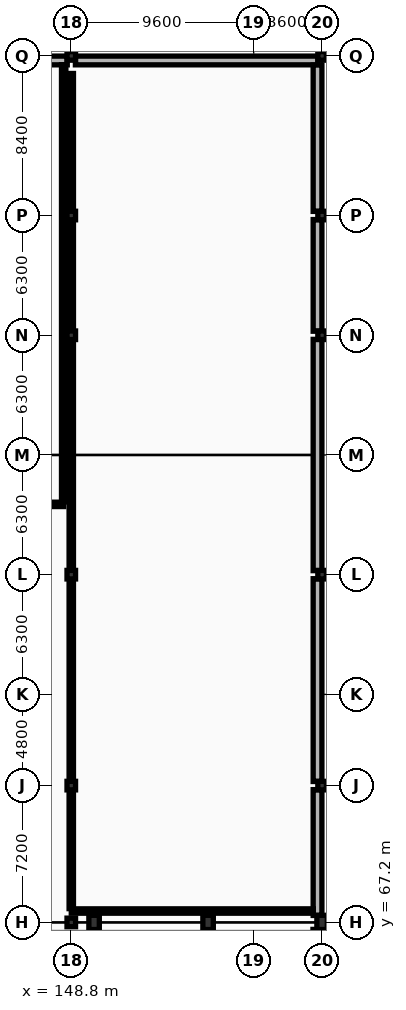
"""IFC4 building model, lengths in metres.
Left out: names, types, materials, properties, quantities, classifications, styles, units other than length and angle.
Written with IfcOpenShell. Run it as: python <this file> out.ifc"""

import sys

from ifc_helpers import new_model, si_unit, direction, frame, frame_2d, origin, origin_2d, place, context, subcontext, project, spatial, rectangle, extrude, element, fill, save


model = new_model("IFC4")
c1 = context("Model", 3, precision=1e-05, world=origin(), true_north=direction((0.0, 1.0)))
c2 = subcontext(c1, "Body", "Model", "MODEL_VIEW")
j1 = project(units=[si_unit("LENGTHUNIT", "METRE"), si_unit("PLANEANGLEUNIT", "RADIAN")], contexts=[c1])
p1 = place(None, origin())
s1 = spatial("IfcSite", under=j1, at=p1, CompositionType="ELEMENT")
p2 = place(p1, origin())
s2 = spatial("IfcBuilding", under=s1, at=p2, CompositionType="ELEMENT")
p3 = place(p2, frame((0.0, 0.0, 5.4)))
s3 = spatial("IfcBuildingStorey", under=s2, at=p3, CompositionType="ELEMENT", Elevation=5.4)
for number, where, z_axis, x_axis in (
    (1, (150.0, 67.2, 0.0), (0.0, 0.0, 1.0), (1.0, 0.0, 0.0)),
    (2, (156.0, 67.2, 0.0), (0.0, 0.0, 1.0), (1.0, 0.0, 0.0)),
    (3, (162.0, 67.2, 0.0), (0.0, 0.0, 1.0), (1.0, 0.0, 0.0)),
):
    element("IfcColumn", number, at=place(p3, frame(where, z_axis=z_axis, x_axis=x_axis)), inside=s3, PredefinedType="COLUMN", context=c2, shape_type="SweptSolid", body=[
        extrude(rectangle(XDim=0.55, YDim=0.75, at=origin_2d()), origin(), (0.0, 0.0, 1.0), 4.5),
    ])
for number, where, z_axis, x_axis in (
    (4, (148.8, 67.2, 0.0), (0.0, 0.0, 1.0), (1.0, 0.0, 0.0)),
    (5, (148.8, 74.4, 0.0), (0.0, 0.0, 1.0), (1.0, 0.0, 0.0)),
    (6, (148.8, 85.5, 0.0), (0.0, 0.0, 1.0), (1.0, 0.0, 0.0)),
    (7, (148.8, 98.1, 0.0), (0.0, 0.0, 1.0), (1.0, 0.0, 0.0)),
    (8, (148.8, 104.4, 0.0), (0.0, 0.0, 1.0), (1.0, 0.0, 0.0)),
    (9, (148.8, 112.8, 0.0), (0.0, 0.0, 1.0), (1.0, 0.0, 0.0)),
    (10, (162.0, 74.4, 0.0), (0.0, 0.0, 1.0), (1.0, 0.0, 0.0)),
    (11, (162.0, 85.5, 0.0), (0.0, 0.0, 1.0), (1.0, 0.0, 0.0)),
    (12, (162.0, 98.1, 0.0), (0.0, 0.0, 1.0), (1.0, 0.0, 0.0)),
    (13, (162.0, 104.4, 0.0), (0.0, 0.0, 1.0), (1.0, 0.0, 0.0)),
    (14, (162.0, 112.8, 0.0), (0.0, 0.0, 1.0), (1.0, 0.0, 0.0)),
):
    element("IfcColumn", number, at=place(p3, frame(where, z_axis=z_axis, x_axis=x_axis)), inside=s3, PredefinedType="COLUMN", context=c2, shape_type="SweptSolid", body=[
        extrude(rectangle(XDim=0.45, YDim=0.45, at=origin_2d()), origin(), (0.0, 0.0, 1.0), 4.5),
    ])
p4 = place(p3, frame((161.76, 66.833, 0.0), z_axis=(0.0, 0.0, 1.0), x_axis=(0.0, -1.0, 0.0)))
e15 = element("IfcWall", 15, at=p4, inside=s3, PredefinedType="STANDARD", context=c2, shape_type="SweptSolid", body=[
    extrude(rectangle(XDim=7.666, YDim=0.48, at=frame_2d((3.833, 0.0))), origin(), (0.0, 0.0, 1.0), 3.27),
])
p5 = place(p4, frame((1.408, 0.0, 0.75)))
e16 = element("IfcOpeningElement", 16, at=p5, cuts=e15, PredefinedType="OPENING", context=c2, shape_type="SweptSolid", body=[
    extrude(rectangle(XDim=1.7, YDim=2.3, at=frame_2d((0.85, 1.15))), frame((0.0, 0.25, 0.0), z_axis=(0.0, -1.0, 0.0), x_axis=(1.0, 0.0, 0.0)), (0.0, 0.0, 1.0), 0.5),
])
p6 = place(p4, frame((4.558, 0.0, 0.75)))
e17 = element("IfcOpeningElement", 17, at=p6, cuts=e15, PredefinedType="OPENING", context=c2, shape_type="SweptSolid", body=[
    extrude(rectangle(XDim=1.7, YDim=2.3, at=frame_2d((0.85, 1.15))), frame((0.0, 0.25, 0.0), z_axis=(0.0, -1.0, 0.0), x_axis=(1.0, 0.0, 0.0)), (0.0, 0.0, 1.0), 0.5),
])
p7 = place(p3, frame((139.412, 112.56, 0.0), z_axis=(0.0, 0.0, 1.0), x_axis=(1.0, 0.0, 0.0)))
e18 = element("IfcWall", 18, at=p7, inside=s3, PredefinedType="STANDARD", context=c2, shape_type="SweptSolid", body=[
    extrude(rectangle(XDim=9.176, YDim=0.46, at=frame_2d((4.588, 0.0))), origin(), (0.0, 0.0, 1.0), 3.72),
])
p8 = place(p7, frame((2.278, 0.0, 2.15)))
e19 = element("IfcOpeningElement", 19, at=p8, cuts=e18, PredefinedType="OPENING", context=c2, shape_type="SweptSolid", body=[
    extrude(rectangle(XDim=0.85, YDim=0.9, at=frame_2d((0.425, 0.45))), frame((0.0, 0.24, 0.0), z_axis=(0.0, -1.0, 0.0), x_axis=(1.0, 0.0, 0.0)), (0.0, 0.0, 1.0), 0.48),
])
p9 = place(p7, frame((6.048, 0.0, 2.15)))
e20 = element("IfcOpeningElement", 20, at=p9, cuts=e18, PredefinedType="OPENING", context=c2, shape_type="SweptSolid", body=[
    extrude(rectangle(XDim=0.85, YDim=0.9, at=frame_2d((0.425, 0.45))), frame((0.0, 0.24, 0.0), z_axis=(0.0, -1.0, 0.0), x_axis=(1.0, 0.0, 0.0)), (0.0, 0.0, 1.0), 0.48),
])
p10 = place(p3, frame((149.017, 112.56, 0.0), z_axis=(0.0, 0.0, 1.0), x_axis=(1.0, 0.0, 0.0)))
e21 = element("IfcWall", 21, at=p10, inside=s3, PredefinedType="STANDARD", context=c2, shape_type="SweptSolid", body=[
    extrude(rectangle(XDim=12.766, YDim=0.46, at=frame_2d((6.383, 0.0))), origin(), (0.0, 0.0, 1.0), 3.72),
])
p11 = place(p10, frame((3.173, 0.0, 2.15)))
e22 = element("IfcOpeningElement", 22, at=p11, cuts=e21, PredefinedType="OPENING", context=c2, shape_type="SweptSolid", body=[
    extrude(rectangle(XDim=0.85, YDim=0.9, at=frame_2d((0.425, 0.45))), frame((0.0, 0.24, 0.0), z_axis=(0.0, -1.0, 0.0), x_axis=(1.0, 0.0, 0.0)), (0.0, 0.0, 1.0), 0.48),
])
p12 = place(p10, frame((8.743, 0.0, 2.15)))
e23 = element("IfcOpeningElement", 23, at=p12, cuts=e21, PredefinedType="OPENING", context=c2, shape_type="SweptSolid", body=[
    extrude(rectangle(XDim=0.85, YDim=0.9, at=frame_2d((0.425, 0.45))), frame((0.0, 0.24, 0.0), z_axis=(0.0, -1.0, 0.0), x_axis=(1.0, 0.0, 0.0)), (0.0, 0.0, 1.0), 0.48),
])
p13 = place(p3, frame((161.76, 74.188, 0.0), z_axis=(0.0, 0.0, 1.0), x_axis=(0.0, -1.0, 0.0)))
e24 = element("IfcWall", 24, at=p13, inside=s3, PredefinedType="STANDARD", context=c2, shape_type="SweptSolid", body=[
    extrude(rectangle(XDim=6.621, YDim=0.46, at=frame_2d((3.311, 0.0))), origin(), (0.0, 0.0, 1.0), 3.37),
])
p14 = place(p13, frame((1.678, 0.0, 2.15)))
e25 = element("IfcOpeningElement", 25, at=p14, cuts=e24, PredefinedType="OPENING", context=c2, shape_type="SweptSolid", body=[
    extrude(rectangle(XDim=0.85, YDim=0.9, at=frame_2d((0.425, 0.45))), frame((0.0, 0.24, 0.0), z_axis=(0.0, -1.0, 0.0), x_axis=(1.0, 0.0, 0.0)), (0.0, 0.0, 1.0), 0.48),
])
p15 = place(p13, frame((4.248, 0.0, 2.15)))
e26 = element("IfcOpeningElement", 26, at=p15, cuts=e24, PredefinedType="OPENING", context=c2, shape_type="SweptSolid", body=[
    extrude(rectangle(XDim=0.85, YDim=0.9, at=frame_2d((0.425, 0.45))), frame((0.0, 0.24, 0.0), z_axis=(0.0, -1.0, 0.0), x_axis=(1.0, 0.0, 0.0)), (0.0, 0.0, 1.0), 0.48),
])
p16 = place(p3, frame((161.76, 85.288, 0.0), z_axis=(0.0, 0.0, 1.0), x_axis=(0.0, -1.0, 0.0)))
e27 = element("IfcWall", 27, at=p16, inside=s3, PredefinedType="STANDARD", context=c2, shape_type="SweptSolid", body=[
    extrude(rectangle(XDim=10.671, YDim=0.46, at=frame_2d((5.335, 0.0))), origin(), (0.0, 0.0, 1.0), 3.37),
])
p17 = place(p16, frame((2.653, 0.0, 2.15)))
e28 = element("IfcOpeningElement", 28, at=p17, cuts=e27, PredefinedType="OPENING", context=c2, shape_type="SweptSolid", body=[
    extrude(rectangle(XDim=0.85, YDim=0.9, at=frame_2d((0.425, 0.45))), frame((0.0, 0.24, 0.0), z_axis=(0.0, -1.0, 0.0), x_axis=(1.0, 0.0, 0.0)), (0.0, 0.0, 1.0), 0.48),
])
p18 = place(p16, frame((7.173, 0.0, 2.15)))
e29 = element("IfcOpeningElement", 29, at=p18, cuts=e27, PredefinedType="OPENING", context=c2, shape_type="SweptSolid", body=[
    extrude(rectangle(XDim=0.85, YDim=0.9, at=frame_2d((0.425, 0.45))), frame((0.0, 0.24, 0.0), z_axis=(0.0, -1.0, 0.0), x_axis=(1.0, 0.0, 0.0)), (0.0, 0.0, 1.0), 0.48),
])
p19 = place(p3, frame((161.76, 97.883, 0.0), z_axis=(0.0, 0.0, 1.0), x_axis=(0.0, -1.0, 0.0)))
e30 = element("IfcWall", 30, at=p19, inside=s3, PredefinedType="STANDARD", context=c2, shape_type="SweptSolid", body=[
    extrude(rectangle(XDim=12.171, YDim=0.46, at=frame_2d((6.085, 0.0))), origin(), (0.0, 0.0, 1.0), 3.37),
])
p20 = place(p19, frame((3.023, 0.0, 2.15)))
e31 = element("IfcOpeningElement", 31, at=p20, cuts=e30, PredefinedType="OPENING", context=c2, shape_type="SweptSolid", body=[
    extrude(rectangle(XDim=0.85, YDim=0.9, at=frame_2d((0.425, 0.45))), frame((0.0, 0.24, 0.0), z_axis=(0.0, -1.0, 0.0), x_axis=(1.0, 0.0, 0.0)), (0.0, 0.0, 1.0), 0.48),
])
p21 = place(p19, frame((8.293, 0.0, 2.15)))
e32 = element("IfcOpeningElement", 32, at=p21, cuts=e30, PredefinedType="OPENING", context=c2, shape_type="SweptSolid", body=[
    extrude(rectangle(XDim=0.85, YDim=0.9, at=frame_2d((0.425, 0.45))), frame((0.0, 0.24, 0.0), z_axis=(0.0, -1.0, 0.0), x_axis=(1.0, 0.0, 0.0)), (0.0, 0.0, 1.0), 0.48),
])
p22 = place(p3, frame((161.76, 104.188, 0.0), z_axis=(0.0, 0.0, 1.0), x_axis=(0.0, -1.0, 0.0)))
e33 = element("IfcWall", 33, at=p22, inside=s3, PredefinedType="STANDARD", context=c2, shape_type="SweptSolid", body=[
    extrude(rectangle(XDim=5.876, YDim=0.46, at=frame_2d((2.938, 0.0))), origin(), (0.0, 0.0, 1.0), 3.37),
])
p23 = place(p22, frame((1.453, 0.0, 2.15)))
e34 = element("IfcOpeningElement", 34, at=p23, cuts=e33, PredefinedType="OPENING", context=c2, shape_type="SweptSolid", body=[
    extrude(rectangle(XDim=0.85, YDim=0.9, at=frame_2d((0.425, 0.45))), frame((0.0, 0.24, 0.0), z_axis=(0.0, -1.0, 0.0), x_axis=(1.0, 0.0, 0.0)), (0.0, 0.0, 1.0), 0.48),
])
p24 = place(p22, frame((3.573, 0.0, 2.15)))
e35 = element("IfcOpeningElement", 35, at=p24, cuts=e33, PredefinedType="OPENING", context=c2, shape_type="SweptSolid", body=[
    extrude(rectangle(XDim=0.85, YDim=0.9, at=frame_2d((0.425, 0.45))), frame((0.0, 0.24, 0.0), z_axis=(0.0, -1.0, 0.0), x_axis=(1.0, 0.0, 0.0)), (0.0, 0.0, 1.0), 0.48),
])
p25 = place(p3, frame((161.76, 112.32, 0.0), z_axis=(0.0, 0.0, 1.0), x_axis=(0.0, -1.0, 0.0)))
e36 = element("IfcWall", 36, at=p25, inside=s3, PredefinedType="STANDARD", context=c2, shape_type="SweptSolid", body=[
    extrude(rectangle(XDim=7.703, YDim=0.46, at=frame_2d((3.852, 0.0))), origin(), (0.0, 0.0, 1.0), 3.67),
])
p26 = place(p25, frame((1.71, 0.0, 2.15)))
e37 = element("IfcOpeningElement", 37, at=p26, cuts=e36, PredefinedType="OPENING", context=c2, shape_type="SweptSolid", body=[
    extrude(rectangle(XDim=0.85, YDim=0.9, at=frame_2d((0.425, 0.45))), frame((0.0, 0.24, 0.0), z_axis=(0.0, -1.0, 0.0), x_axis=(1.0, 0.0, 0.0)), (0.0, 0.0, 1.0), 0.48),
])
p27 = place(p25, frame((4.88, 0.0, 2.15)))
e38 = element("IfcOpeningElement", 38, at=p27, cuts=e36, PredefinedType="OPENING", context=c2, shape_type="SweptSolid", body=[
    extrude(rectangle(XDim=0.85, YDim=0.9, at=frame_2d((0.425, 0.45))), frame((0.0, 0.24, 0.0), z_axis=(0.0, -1.0, 0.0), x_axis=(1.0, 0.0, 0.0)), (0.0, 0.0, 1.0), 0.48),
])
p28 = place(p3, frame((161.536, 67.8, 0.0), z_axis=(0.0, 0.0, 1.0), x_axis=(-1.0, 0.0, 0.0)))
e39 = element("IfcWall", 39, at=p28, inside=s3, PredefinedType="STANDARD", context=c2, shape_type="SweptSolid", body=[
    extrude(rectangle(XDim=12.736, YDim=0.23, at=frame_2d((6.368, 0.0))), origin(), (0.0, 0.0, 1.0), 3.72),
])
p29 = place(p3, frame((148.8, 67.925, 0.0), z_axis=(0.0, 0.0, 1.0), x_axis=(0.0, 1.0, 0.0)))
e40 = element("IfcWall", 40, at=p29, inside=s3, PredefinedType="STANDARD", context=c2, shape_type="SweptSolid", body=[
    extrude(rectangle(XDim=43.95, YDim=0.23, at=frame_2d((21.975, 0.0))), origin(), (0.0, 0.0, 1.0), 3.37),
])
p30 = place(p29, frame((2.46, 0.0, 0.0)))
e41 = element("IfcOpeningElement", 41, at=p30, cuts=e40, PredefinedType="OPENING", context=c2, shape_type="SweptSolid", body=[
    extrude(rectangle(XDim=1.05, YDim=2.15, at=frame_2d((0.525, 1.075))), frame((0.0, 0.125, 0.0), z_axis=(0.0, -1.0, 0.0), x_axis=(1.0, 0.0, 0.0)), (0.0, 0.0, 1.0), 0.25),
])
p31 = place(p3, frame((148.4, 89.2, 0.0), z_axis=(0.0, 0.0, 1.0), x_axis=(-1.0, 0.0, 0.0)))
e42 = element("IfcWall", 42, at=p31, inside=s3, PredefinedType="STANDARD", context=c2, shape_type="SweptSolid", body=[
    extrude(rectangle(XDim=27.8, YDim=0.23, at=frame_2d((13.9, 0.0))), origin(), (0.0, 0.0, 1.0), 3.37),
])
p32 = place(p31, frame((2.955, 0.0, 0.0)))
e43 = element("IfcOpeningElement", 43, at=p32, cuts=e42, PredefinedType="OPENING", context=c2, shape_type="SweptSolid", body=[
    extrude(rectangle(XDim=1.05, YDim=2.15, at=frame_2d((0.525, 1.075))), frame((0.0, 0.125, 0.0), z_axis=(0.0, -1.0, 0.0), x_axis=(1.0, 0.0, 0.0)), (0.0, 0.0, 1.0), 0.25),
])
p33 = place(p3, frame((148.4, 112.336, 0.0), z_axis=(0.0, 0.0, 1.0), x_axis=(0.0, -1.0, 0.0)))
e44 = element("IfcWall", 44, at=p33, inside=s3, PredefinedType="STANDARD", context=c2, shape_type="SweptSolid", body=[
    extrude(rectangle(XDim=23.011, YDim=0.23, at=frame_2d((11.505, 0.0))), origin(), (0.0, 0.0, 1.0), 3.37),
])
p34 = place(p11, origin())
e45 = element("IfcWindow", 45, at=p34, inside=s3, PartitioningType="SINGLE_PANEL", PredefinedType="WINDOW", context=c2, shape_type="SweptSolid", body=[
    extrude(rectangle(XDim=0.85, YDim=0.9, at=frame_2d((0.425, 0.45))), frame((0.0, 0.03, 0.0), z_axis=(0.0, -1.0, 0.0), x_axis=(1.0, 0.0, 0.0)), (0.0, 0.0, 1.0), 0.06),
])
fill(e22, e45)
p35 = place(p12, origin())
e46 = element("IfcWindow", 46, at=p35, inside=s3, PartitioningType="SINGLE_PANEL", PredefinedType="WINDOW", context=c2, shape_type="SweptSolid", body=[
    extrude(rectangle(XDim=0.85, YDim=0.9, at=frame_2d((0.425, 0.45))), frame((0.0, 0.03, 0.0), z_axis=(0.0, -1.0, 0.0), x_axis=(1.0, 0.0, 0.0)), (0.0, 0.0, 1.0), 0.06),
])
fill(e23, e46)
p36 = place(p14, origin())
e47 = element("IfcWindow", 47, at=p36, inside=s3, PartitioningType="SINGLE_PANEL", PredefinedType="WINDOW", context=c2, shape_type="SweptSolid", body=[
    extrude(rectangle(XDim=0.85, YDim=0.9, at=frame_2d((0.425, 0.45))), frame((0.0, 0.03, 0.0), z_axis=(0.0, -1.0, 0.0), x_axis=(1.0, 0.0, 0.0)), (0.0, 0.0, 1.0), 0.06),
])
fill(e25, e47)
p37 = place(p15, origin())
e48 = element("IfcWindow", 48, at=p37, inside=s3, PartitioningType="SINGLE_PANEL", PredefinedType="WINDOW", context=c2, shape_type="SweptSolid", body=[
    extrude(rectangle(XDim=0.85, YDim=0.9, at=frame_2d((0.425, 0.45))), frame((0.0, 0.03, 0.0), z_axis=(0.0, -1.0, 0.0), x_axis=(1.0, 0.0, 0.0)), (0.0, 0.0, 1.0), 0.06),
])
fill(e26, e48)
p38 = place(p17, origin())
e49 = element("IfcWindow", 49, at=p38, inside=s3, PartitioningType="SINGLE_PANEL", PredefinedType="WINDOW", context=c2, shape_type="SweptSolid", body=[
    extrude(rectangle(XDim=0.85, YDim=0.9, at=frame_2d((0.425, 0.45))), frame((0.0, 0.03, 0.0), z_axis=(0.0, -1.0, 0.0), x_axis=(1.0, 0.0, 0.0)), (0.0, 0.0, 1.0), 0.06),
])
fill(e28, e49)
p39 = place(p18, origin())
e50 = element("IfcWindow", 50, at=p39, inside=s3, PartitioningType="SINGLE_PANEL", PredefinedType="WINDOW", context=c2, shape_type="SweptSolid", body=[
    extrude(rectangle(XDim=0.85, YDim=0.9, at=frame_2d((0.425, 0.45))), frame((0.0, 0.03, 0.0), z_axis=(0.0, -1.0, 0.0), x_axis=(1.0, 0.0, 0.0)), (0.0, 0.0, 1.0), 0.06),
])
fill(e29, e50)
p40 = place(p20, origin())
e51 = element("IfcWindow", 51, at=p40, inside=s3, PartitioningType="SINGLE_PANEL", PredefinedType="WINDOW", context=c2, shape_type="SweptSolid", body=[
    extrude(rectangle(XDim=0.85, YDim=0.9, at=frame_2d((0.425, 0.45))), frame((0.0, 0.03, 0.0), z_axis=(0.0, -1.0, 0.0), x_axis=(1.0, 0.0, 0.0)), (0.0, 0.0, 1.0), 0.06),
])
fill(e31, e51)
p41 = place(p21, origin())
e52 = element("IfcWindow", 52, at=p41, inside=s3, PartitioningType="SINGLE_PANEL", PredefinedType="WINDOW", context=c2, shape_type="SweptSolid", body=[
    extrude(rectangle(XDim=0.85, YDim=0.9, at=frame_2d((0.425, 0.45))), frame((0.0, 0.03, 0.0), z_axis=(0.0, -1.0, 0.0), x_axis=(1.0, 0.0, 0.0)), (0.0, 0.0, 1.0), 0.06),
])
fill(e32, e52)
p42 = place(p23, origin())
e53 = element("IfcWindow", 53, at=p42, inside=s3, PartitioningType="SINGLE_PANEL", PredefinedType="WINDOW", context=c2, shape_type="SweptSolid", body=[
    extrude(rectangle(XDim=0.85, YDim=0.9, at=frame_2d((0.425, 0.45))), frame((0.0, 0.03, 0.0), z_axis=(0.0, -1.0, 0.0), x_axis=(1.0, 0.0, 0.0)), (0.0, 0.0, 1.0), 0.06),
])
fill(e34, e53)
p43 = place(p24, origin())
e54 = element("IfcWindow", 54, at=p43, inside=s3, PartitioningType="SINGLE_PANEL", PredefinedType="WINDOW", context=c2, shape_type="SweptSolid", body=[
    extrude(rectangle(XDim=0.85, YDim=0.9, at=frame_2d((0.425, 0.45))), frame((0.0, 0.03, 0.0), z_axis=(0.0, -1.0, 0.0), x_axis=(1.0, 0.0, 0.0)), (0.0, 0.0, 1.0), 0.06),
])
fill(e35, e54)
p44 = place(p26, origin())
e55 = element("IfcWindow", 55, at=p44, inside=s3, PartitioningType="SINGLE_PANEL", PredefinedType="WINDOW", context=c2, shape_type="SweptSolid", body=[
    extrude(rectangle(XDim=0.85, YDim=0.9, at=frame_2d((0.425, 0.45))), frame((0.0, 0.03, 0.0), z_axis=(0.0, -1.0, 0.0), x_axis=(1.0, 0.0, 0.0)), (0.0, 0.0, 1.0), 0.06),
])
fill(e37, e55)
p45 = place(p27, origin())
e56 = element("IfcWindow", 56, at=p45, inside=s3, PartitioningType="SINGLE_PANEL", PredefinedType="WINDOW", context=c2, shape_type="SweptSolid", body=[
    extrude(rectangle(XDim=0.85, YDim=0.9, at=frame_2d((0.425, 0.45))), frame((0.0, 0.03, 0.0), z_axis=(0.0, -1.0, 0.0), x_axis=(1.0, 0.0, 0.0)), (0.0, 0.0, 1.0), 0.06),
])
fill(e38, e56)
p46 = place(p30, origin())
e57 = element("IfcDoor", 57, at=p46, inside=s3, OperationType="SINGLE_SWING_RIGHT", PredefinedType="DOOR", context=c2, shape_type="SweptSolid", body=[
    extrude(rectangle(XDim=1.05, YDim=2.15, at=frame_2d((0.525, 1.075))), frame((0.0, 0.025, 0.0), z_axis=(0.0, -1.0, 0.0), x_axis=(1.0, 0.0, 0.0)), (0.0, 0.0, 1.0), 0.05),
])
fill(e41, e57)
save(model, sys.argv[1])
